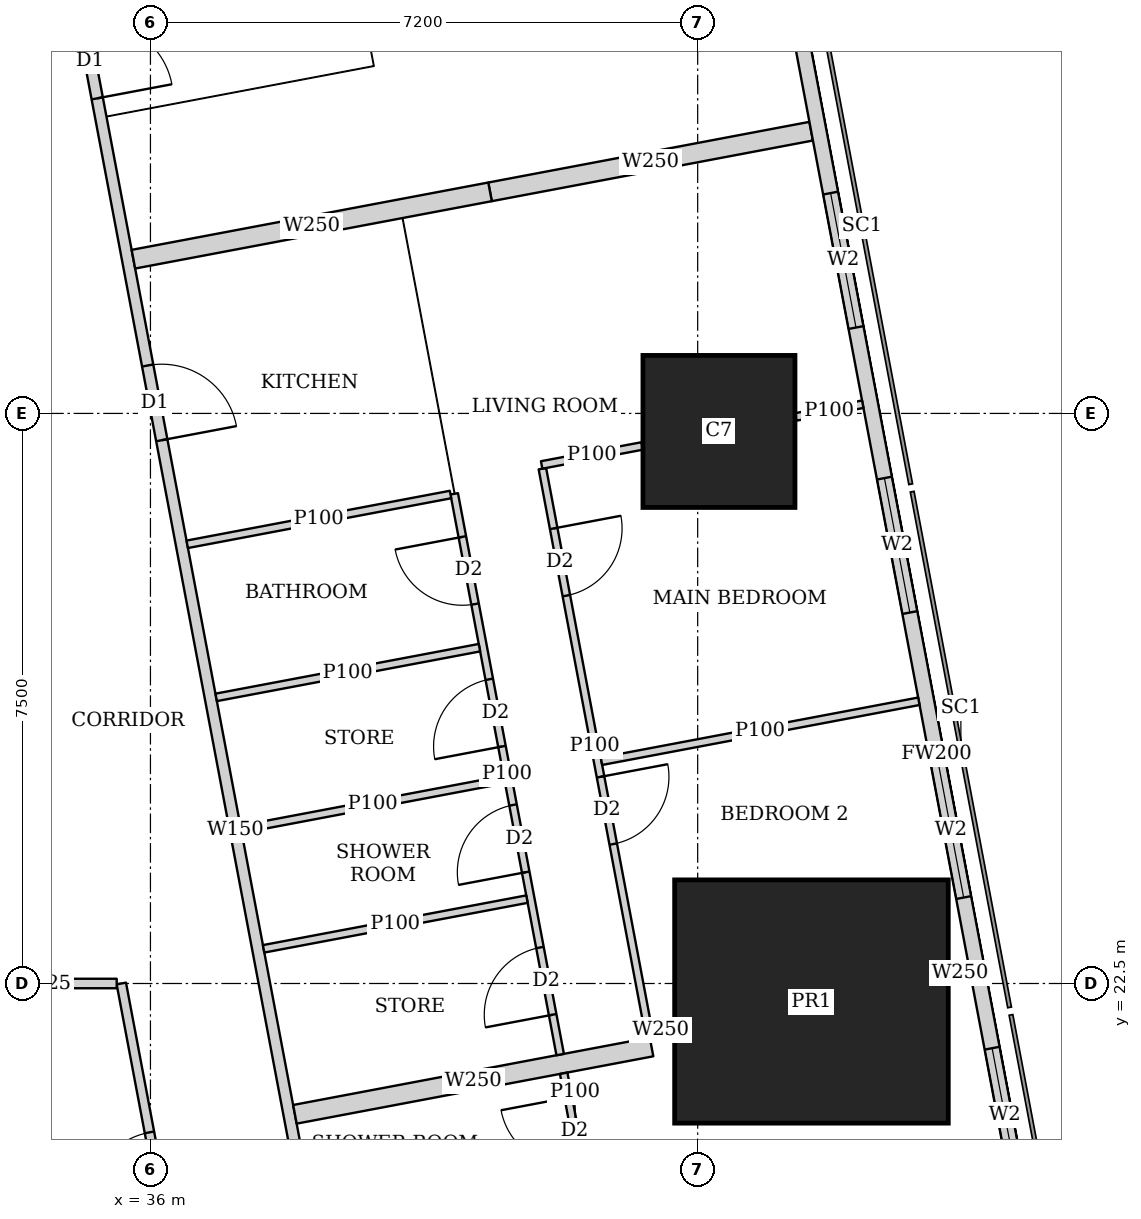
"""IFC4 building model, lengths in metres.
Left out: names, types, materials, properties, quantities, classifications, styles, units other than length and angle.
Written with IfcOpenShell. Run it as: python <this file> out.ifc"""

import sys

from ifc_helpers import new_model, si_unit, direction, frame, frame_2d, origin, origin_2d, place, context, subcontext, project, spatial, rectangle, extrude, element, fill, save


model = new_model("IFC4")
c1 = context("Model", 3, precision=1e-05, world=origin(), true_north=direction((0.0, 1.0)))
c2 = subcontext(c1, "Body", "Model", "MODEL_VIEW")
j1 = project(units=[si_unit("LENGTHUNIT", "METRE"), si_unit("PLANEANGLEUNIT", "RADIAN")], contexts=[c1])
p1 = place(None, origin())
s1 = spatial("IfcSite", under=j1, at=p1, CompositionType="ELEMENT")
p2 = place(p1, origin())
s2 = spatial("IfcBuilding", under=s1, at=p2, CompositionType="ELEMENT")
p3 = place(p2, frame((0.0, 0.0, 251.6)))
s3 = spatial("IfcBuildingStorey", under=s2, at=p3, CompositionType="ELEMENT", Elevation=251.6)
p4 = place(p3, frame((44.697, 22.263, 0.0), z_axis=(0.0, 0.0, 1.0), x_axis=(1.0, 0.0, 0.0)))
e1 = element("IfcColumn", 1, at=p4, inside=s3, PredefinedType="COLUMN", context=c2, shape_type="SweptSolid", body=[
    extrude(rectangle(XDim=3.6, YDim=3.2, at=origin_2d()), origin(), (0.0, 0.0, 1.0), 3.75),
])
p5 = place(p3, frame((43.48, 29.763, 0.0), z_axis=(0.0, 0.0, 1.0), x_axis=(1.0, 0.0, 0.0)))
e2 = element("IfcColumn", 2, at=p5, inside=s3, PredefinedType="COLUMN", context=c2, shape_type="SweptSolid", body=[
    extrude(rectangle(XDim=2.0, YDim=2.0, at=origin_2d()), origin(), (0.0, 0.0, 1.0), 3.75),
])
p6 = place(p3, frame((49.684, 7.832, 0.0), z_axis=(0.0, 0.0, 1.0), x_axis=(-0.185616669694, 0.982622232565, 0.0)))
e3 = element("IfcWall", 3, at=p6, inside=s3, PredefinedType="SOLIDWALL", context=c2, shape_type="SweptSolid", body=[
    extrude(rectangle(XDim=36.0, YDim=0.2, at=frame_2d((18.0, 0.0))), origin(), (0.0, 0.0, 1.0), 3.5),
])
p7 = place(p6, frame((2.518, 0.0, 0.9)))
e4 = element("IfcOpeningElement", 4, at=p7, cuts=e3, PredefinedType="OPENING", context=c2, shape_type="SweptSolid", body=[
    extrude(rectangle(XDim=2.4, YDim=1.5, at=frame_2d((1.2, 0.75))), frame((0.0, 0.11, 0.0), z_axis=(0.0, -1.0, 0.0), x_axis=(1.0, 0.0, 0.0)), (0.0, 0.0, 1.0), 0.22),
])
p8 = place(p6, frame((8.444, 0.0, 0.9)))
e5 = element("IfcOpeningElement", 5, at=p8, cuts=e3, PredefinedType="OPENING", context=c2, shape_type="SweptSolid", body=[
    extrude(rectangle(XDim=1.8, YDim=1.5, at=frame_2d((0.9, 0.75))), frame((0.0, 0.11, 0.0), z_axis=(0.0, -1.0, 0.0), x_axis=(1.0, 0.0, 0.0)), (0.0, 0.0, 1.0), 0.22),
])
p9 = place(p6, frame((12.261, 0.0, 0.9)))
e6 = element("IfcOpeningElement", 6, at=p9, cuts=e3, PredefinedType="OPENING", context=c2, shape_type="SweptSolid", body=[
    extrude(rectangle(XDim=1.8, YDim=1.5, at=frame_2d((0.9, 0.75))), frame((0.0, 0.11, 0.0), z_axis=(0.0, -1.0, 0.0), x_axis=(1.0, 0.0, 0.0)), (0.0, 0.0, 1.0), 0.22),
])
p10 = place(p6, frame((16.078, 0.0, 0.9)))
e7 = element("IfcOpeningElement", 7, at=p10, cuts=e3, PredefinedType="OPENING", context=c2, shape_type="SweptSolid", body=[
    extrude(rectangle(XDim=1.8, YDim=1.5, at=frame_2d((0.9, 0.75))), frame((0.0, 0.11, 0.0), z_axis=(0.0, -1.0, 0.0), x_axis=(1.0, 0.0, 0.0)), (0.0, 0.0, 1.0), 0.22),
])
p11 = place(p6, frame((19.894, 0.0, 0.9)))
e8 = element("IfcOpeningElement", 8, at=p11, cuts=e3, PredefinedType="OPENING", context=c2, shape_type="SweptSolid", body=[
    extrude(rectangle(XDim=1.8, YDim=1.5, at=frame_2d((0.9, 0.75))), frame((0.0, 0.11, 0.0), z_axis=(0.0, -1.0, 0.0), x_axis=(1.0, 0.0, 0.0)), (0.0, 0.0, 1.0), 0.22),
])
p12 = place(p6, frame((23.71, 0.0, 0.9)))
e9 = element("IfcOpeningElement", 9, at=p12, cuts=e3, PredefinedType="OPENING", context=c2, shape_type="SweptSolid", body=[
    extrude(rectangle(XDim=1.8, YDim=1.5, at=frame_2d((0.9, 0.75))), frame((0.0, 0.11, 0.0), z_axis=(0.0, -1.0, 0.0), x_axis=(1.0, 0.0, 0.0)), (0.0, 0.0, 1.0), 0.22),
])
p13 = place(p6, frame((27.526, 0.0, 0.9)))
e10 = element("IfcOpeningElement", 10, at=p13, cuts=e3, PredefinedType="OPENING", context=c2, shape_type="SweptSolid", body=[
    extrude(rectangle(XDim=1.8, YDim=1.5, at=frame_2d((0.9, 0.75))), frame((0.0, 0.11, 0.0), z_axis=(0.0, -1.0, 0.0), x_axis=(1.0, 0.0, 0.0)), (0.0, 0.0, 1.0), 0.22),
])
p14 = place(p6, frame((32.046, 0.0, 0.9)))
e11 = element("IfcOpeningElement", 11, at=p14, cuts=e3, PredefinedType="OPENING", context=c2, shape_type="SweptSolid", body=[
    extrude(rectangle(XDim=1.8, YDim=1.5, at=frame_2d((0.9, 0.75))), frame((0.0, 0.11, 0.0), z_axis=(0.0, -1.0, 0.0), x_axis=(1.0, 0.0, 0.0)), (0.0, 0.0, 1.0), 0.22),
])
p15 = place(p3, frame((33.781, 42.186, 0.0), z_axis=(0.0, 0.0, 1.0), x_axis=(0.185593518645, -0.9826266055, 0.0)))
e12 = element("IfcWall", 12, at=p15, inside=s3, PredefinedType="SOLIDWALL", context=c2, shape_type="SweptSolid", body=[
    extrude(rectangle(XDim=35.961, YDim=0.15, at=frame_2d((17.98, 0.0))), origin(), (0.0, 0.0, 1.0), 2.5),
])
p16 = place(p15, frame((7.183, 0.0, 0.0)))
e13 = element("IfcOpeningElement", 13, at=p16, cuts=e12, PredefinedType="OPENING", context=c2, shape_type="SweptSolid", body=[
    extrude(rectangle(XDim=1.0, YDim=2.1, at=frame_2d((0.5, 1.05))), frame((0.0, 0.085, 0.0), z_axis=(0.0, -1.0, 0.0), x_axis=(1.0, 0.0, 0.0)), (0.0, 0.0, 1.0), 0.17),
])
p17 = place(p15, frame((11.76, 0.0, 0.0)))
e14 = element("IfcOpeningElement", 14, at=p17, cuts=e12, PredefinedType="OPENING", context=c2, shape_type="SweptSolid", body=[
    extrude(rectangle(XDim=1.0, YDim=2.1, at=frame_2d((0.5, 1.05))), frame((0.0, 0.085, 0.0), z_axis=(0.0, -1.0, 0.0), x_axis=(1.0, 0.0, 0.0)), (0.0, 0.0, 1.0), 0.17),
])
p18 = place(p15, frame((23.863, 0.0, 0.0)))
e15 = element("IfcOpeningElement", 15, at=p18, cuts=e12, PredefinedType="OPENING", context=c2, shape_type="SweptSolid", body=[
    extrude(rectangle(XDim=1.0, YDim=2.1, at=frame_2d((0.5, 1.05))), frame((0.0, 0.085, 0.0), z_axis=(0.0, -1.0, 0.0), x_axis=(1.0, 0.0, 0.0)), (0.0, 0.0, 1.0), 0.17),
])
p19 = place(p15, frame((30.502, 0.0, 0.0)))
e16 = element("IfcOpeningElement", 16, at=p19, cuts=e12, PredefinedType="OPENING", context=c2, shape_type="SweptSolid", body=[
    extrude(rectangle(XDim=1.0, YDim=2.1, at=frame_2d((0.5, 1.05))), frame((0.0, 0.085, 0.0), z_axis=(0.0, -1.0, 0.0), x_axis=(1.0, 0.0, 0.0)), (0.0, 0.0, 1.0), 0.17),
])
p20 = place(p3, frame((41.157, 29.273, 0.0), z_axis=(0.0, 0.0, 1.0), x_axis=(0.18542464283, -0.982658486877, 0.0)))
e17 = element("IfcWall", 17, at=p20, inside=s3, PredefinedType="PARTITIONING", context=c2, shape_type="SweptSolid", body=[
    extrude(rectangle(XDim=7.421, YDim=0.1, at=frame_2d((3.71, 0.0))), origin(), (0.0, 0.0, 1.0), 2.5),
])
p21 = place(p20, frame((0.8, 0.0, 0.0)))
e18 = element("IfcOpeningElement", 18, at=p21, cuts=e17, PredefinedType="OPENING", context=c2, shape_type="SweptSolid", body=[
    extrude(rectangle(XDim=0.9, YDim=2.1, at=frame_2d((0.45, 1.05))), frame((0.0, 0.06, 0.0), z_axis=(0.0, -1.0, 0.0), x_axis=(1.0, 0.0, 0.0)), (0.0, 0.0, 1.0), 0.12),
])
p22 = place(p20, frame((4.126, 0.0, 0.0)))
e19 = element("IfcOpeningElement", 19, at=p22, cuts=e17, PredefinedType="OPENING", context=c2, shape_type="SweptSolid", body=[
    extrude(rectangle(XDim=0.9, YDim=2.1, at=frame_2d((0.45, 1.05))), frame((0.0, 0.06, 0.0), z_axis=(0.0, -1.0, 0.0), x_axis=(1.0, 0.0, 0.0)), (0.0, 0.0, 1.0), 0.12),
])
p23 = place(p3, frame((39.997, 28.942, 0.0), z_axis=(0.0, 0.0, 1.0), x_axis=(0.185686318797, -0.982609073341, 0.0)))
e20 = element("IfcWall", 20, at=p23, inside=s3, PredefinedType="PARTITIONING", context=c2, shape_type="SweptSolid", body=[
    extrude(rectangle(XDim=7.508, YDim=0.1, at=frame_2d((3.754, 0.0))), origin(), (0.0, 0.0, 1.0), 2.5),
])
p24 = place(p23, frame((0.576, 0.0, 0.0)))
e21 = element("IfcOpeningElement", 21, at=p24, cuts=e20, PredefinedType="OPENING", context=c2, shape_type="SweptSolid", body=[
    extrude(rectangle(XDim=0.9, YDim=2.1, at=frame_2d((0.45, 1.05))), frame((0.0, 0.06, 0.0), z_axis=(0.0, -1.0, 0.0), x_axis=(1.0, 0.0, 0.0)), (0.0, 0.0, 1.0), 0.12),
])
p25 = place(p23, frame((4.166, 0.0, 0.0)))
e22 = element("IfcOpeningElement", 22, at=p25, cuts=e20, PredefinedType="OPENING", context=c2, shape_type="SweptSolid", body=[
    extrude(rectangle(XDim=0.9, YDim=2.1, at=frame_2d((0.45, 1.05))), frame((0.0, 0.06, 0.0), z_axis=(0.0, -1.0, 0.0), x_axis=(1.0, 0.0, 0.0)), (0.0, 0.0, 1.0), 0.12),
])
p26 = place(p23, frame((2.483, 0.0, 0.0)))
e23 = element("IfcOpeningElement", 23, at=p26, cuts=e20, PredefinedType="OPENING", context=c2, shape_type="SweptSolid", body=[
    extrude(rectangle(XDim=0.9, YDim=2.1, at=frame_2d((0.45, 1.05))), frame((0.0, 0.06, 0.0), z_axis=(0.0, -1.0, 0.0), x_axis=(1.0, 0.0, 0.0)), (0.0, 0.0, 1.0), 0.12),
])
p27 = place(p23, frame((6.074, 0.0, 0.0)))
e24 = element("IfcOpeningElement", 24, at=p27, cuts=e20, PredefinedType="OPENING", context=c2, shape_type="SweptSolid", body=[
    extrude(rectangle(XDim=0.9, YDim=2.1, at=frame_2d((0.45, 1.05))), frame((0.0, 0.06, 0.0), z_axis=(0.0, -1.0, 0.0), x_axis=(1.0, 0.0, 0.0)), (0.0, 0.0, 1.0), 0.12),
])
p28 = place(p3, frame((45.372, 30.121, 0.0), z_axis=(0.0, 0.0, 1.0), x_axis=(-0.982547416156, -0.186012297994, 0.0)))
e25 = element("IfcWall", 25, at=p28, inside=s3, PredefinedType="PARTITIONING", context=c2, shape_type="SweptSolid", body=[
    extrude(rectangle(XDim=0.898, YDim=0.1, at=frame_2d((0.449, 0.0))), origin(), (0.0, 0.0, 1.0), 3.5),
])
p29 = place(p3, frame((42.47, 29.572, 0.0), z_axis=(0.0, 0.0, 1.0), x_axis=(-0.982610503289, -0.185678751683, 0.0)))
e26 = element("IfcWall", 26, at=p29, inside=s3, PredefinedType="PARTITIONING", context=c2, shape_type="SweptSolid", body=[
    extrude(rectangle(XDim=1.346, YDim=0.1, at=frame_2d((0.673, 0.0))), origin(), (0.0, 0.0, 1.0), 2.5),
])
p30 = place(p3, frame((46.11, 26.213, 0.0), z_axis=(0.0, 0.0, 1.0), x_axis=(-0.982623519589, -0.185609856287, 0.0)))
e27 = element("IfcWall", 27, at=p30, inside=s3, PredefinedType="PARTITIONING", context=c2, shape_type="SweptSolid", body=[
    extrude(rectangle(XDim=4.25, YDim=0.1, at=frame_2d((2.125, 0.0))), origin(), (0.0, 0.0, 1.0), 2.5),
])
p31 = place(p3, frame((39.948, 28.933, 0.0), z_axis=(0.0, 0.0, 1.0), x_axis=(-0.982588017646, -0.185797706064, 0.0)))
e28 = element("IfcWall", 28, at=p31, inside=s3, PredefinedType="PARTITIONING", context=c2, shape_type="SweptSolid", body=[
    extrude(rectangle(XDim=3.525, YDim=0.1, at=frame_2d((1.763, 0.0))), origin(), (0.0, 0.0, 1.0), 3.5),
])
p32 = place(p3, frame((40.656, 25.183, 0.0), z_axis=(0.0, 0.0, 1.0), x_axis=(-0.982576058723, -0.185860939478, 0.0)))
e29 = element("IfcWall", 29, at=p32, inside=s3, PredefinedType="PARTITIONING", context=c2, shape_type="SweptSolid", body=[
    extrude(rectangle(XDim=3.524, YDim=0.1, at=frame_2d((1.762, 0.0))), origin(), (0.0, 0.0, 1.0), 3.5),
])
p33 = place(p3, frame((40.329, 26.918, 0.0), z_axis=(0.0, 0.0, 1.0), x_axis=(-0.982638553676, -0.185530247748, 0.0)))
e30 = element("IfcWall", 30, at=p33, inside=s3, PredefinedType="PARTITIONING", context=c2, shape_type="SweptSolid", body=[
    extrude(rectangle(XDim=3.525, YDim=0.1, at=frame_2d((1.763, 0.0))), origin(), (0.0, 0.0, 1.0), 3.5),
])
p34 = place(p3, frame((40.954, 23.61, 0.0), z_axis=(0.0, 0.0, 1.0), x_axis=(-0.98264808502, -0.18547975902, 0.0)))
e31 = element("IfcWall", 31, at=p34, inside=s3, PredefinedType="PARTITIONING", context=c2, shape_type="SweptSolid", body=[
    extrude(rectangle(XDim=3.526, YDim=0.1, at=frame_2d((1.763, 0.0))), origin(), (0.0, 0.0, 1.0), 2.5),
])
p35 = place(p3, frame((44.693, 33.713, 0.0), z_axis=(0.0, 0.0, 1.0), x_axis=(-0.982633535512, -0.185556823879, 0.0)))
e32 = element("IfcWall", 32, at=p35, inside=s3, PredefinedType="SOLIDWALL", context=c2, shape_type="SweptSolid", body=[
    extrude(rectangle(XDim=4.3, YDim=0.25, at=frame_2d((2.15, 0.0))), origin(), (0.0, 0.0, 1.0), 2.5),
])
p36 = place(p3, frame((40.468, 32.915, 0.0), z_axis=(0.0, 0.0, 1.0), x_axis=(-0.982635807605, -0.185544791394, 0.0)))
e33 = element("IfcWall", 33, at=p36, inside=s3, PredefinedType="SOLIDWALL", context=c2, shape_type="SweptSolid", body=[
    extrude(rectangle(XDim=4.775, YDim=0.25, at=frame_2d((2.388, 0.0))), origin(), (0.0, 0.0, 1.0), 3.5),
])
p37 = place(p3, frame((41.437, 21.319, 0.0), z_axis=(0.0, 0.0, 1.0), x_axis=(0.185793689589, -0.982588777113, 0.0)))
e34 = element("IfcWall", 34, at=p37, inside=s3, PredefinedType="PARTITIONING", context=c2, shape_type="SweptSolid", body=[
    extrude(rectangle(XDim=1.625, YDim=0.1, at=frame_2d((0.813, 0.0))), origin(), (0.0, 0.0, 1.0), 3.5),
])
p38 = place(p37, frame((0.325, 0.0, 0.0)))
e35 = element("IfcOpeningElement", 35, at=p38, cuts=e34, PredefinedType="OPENING", context=c2, shape_type="SweptSolid", body=[
    extrude(rectangle(XDim=0.9, YDim=2.1, at=frame_2d((0.45, 1.05))), frame((0.0, 0.06, 0.0), z_axis=(0.0, -1.0, 0.0), x_axis=(1.0, 0.0, 0.0)), (0.0, 0.0, 1.0), 0.12),
])
p39 = place(p3, frame((46.782, 22.657, 0.0), z_axis=(0.0, 0.0, 1.0), x_axis=(-0.982104607121, -0.188336243648, 0.0)))
e36 = element("IfcWall", 36, at=p39, inside=s3, PredefinedType="SOLIDWALL", context=c2, shape_type="SweptSolid", body=[
    extrude(rectangle(XDim=0.266, YDim=0.25, at=frame_2d((0.133, 0.0))), origin(), (0.0, 0.0, 1.0), 3.5),
])
p40 = place(p3, frame((42.873, 21.918, 0.0), z_axis=(0.0, 0.0, 1.0), x_axis=(-0.982431406936, -0.186624035603, 0.0)))
e37 = element("IfcWall", 37, at=p40, inside=s3, PredefinedType="SOLIDWALL", context=c2, shape_type="SweptSolid", body=[
    extrude(rectangle(XDim=0.322, YDim=0.25, at=frame_2d((0.161, 0.0))), origin(), (0.0, 0.0, 1.0), 2.5),
])
p41 = place(p3, frame((42.593, 21.665, 0.0), z_axis=(0.0, 0.0, 1.0), x_axis=(-0.982635807605, -0.185544791394, 0.0)))
e38 = element("IfcWall", 38, at=p41, inside=s3, PredefinedType="SOLIDWALL", context=c2, shape_type="SweptSolid", body=[
    extrude(rectangle(XDim=4.775, YDim=0.25, at=frame_2d((2.388, 0.0))), origin(), (0.0, 0.0, 1.0), 2.5),
])
p42 = place(p3, frame((37.947, 10.163, 0.0), z_axis=(0.0, 0.0, 1.0), x_axis=(-0.185589250699, 0.982627411599, 0.0)))
e39 = element("IfcWall", 39, at=p42, inside=s3, PredefinedType="PARTITIONING", context=c2, shape_type="SweptSolid", body=[
    extrude(rectangle(XDim=12.555, YDim=0.125, at=frame_2d((6.277, 0.0))), origin(), (0.0, 0.0, 1.0), 2.5),
])
p43 = place(p42, frame((0.708, 0.0, 0.0)))
e40 = element("IfcOpeningElement", 40, at=p43, cuts=e39, PredefinedType="OPENING", context=c2, shape_type="SweptSolid", body=[
    extrude(rectangle(XDim=1.0, YDim=2.1, at=frame_2d((0.5, 1.05))), frame((0.0, 0.073, 0.0), z_axis=(0.0, -1.0, 0.0), x_axis=(1.0, 0.0, 0.0)), (0.0, 0.0, 1.0), 0.145),
])
p44 = place(p42, frame((5.9, 0.0, 0.0)))
e41 = element("IfcOpeningElement", 41, at=p44, cuts=e39, PredefinedType="OPENING", context=c2, shape_type="SweptSolid", body=[
    extrude(rectangle(XDim=1.0, YDim=2.1, at=frame_2d((0.5, 1.05))), frame((0.0, 0.073, 0.0), z_axis=(0.0, -1.0, 0.0), x_axis=(1.0, 0.0, 0.0)), (0.0, 0.0, 1.0), 0.145),
])
p45 = place(p42, frame((9.562, 0.0, 0.0)))
e42 = element("IfcOpeningElement", 42, at=p45, cuts=e39, PredefinedType="OPENING", context=c2, shape_type="SweptSolid", body=[
    extrude(rectangle(XDim=1.0, YDim=2.1, at=frame_2d((0.5, 1.05))), frame((0.0, 0.073, 0.0), z_axis=(0.0, -1.0, 0.0), x_axis=(1.0, 0.0, 0.0)), (0.0, 0.0, 1.0), 0.145),
])
p46 = place(p3, frame((33.701, 22.5, 0.0), z_axis=(0.0, 0.0, 1.0), x_axis=(1.0, 0.0, 0.0)))
e43 = element("IfcWall", 43, at=p46, inside=s3, PredefinedType="PARTITIONING", context=c2, shape_type="SweptSolid", body=[
    extrude(rectangle(XDim=1.855, YDim=0.125, at=frame_2d((0.927, 0.0))), origin(), (0.0, 0.0, 1.0), 2.5),
])
p47 = place(p9, origin())
e44 = element("IfcWindow", 44, at=p47, inside=s3, PartitioningType="SINGLE_PANEL", PredefinedType="WINDOW", context=c2, shape_type="SweptSolid", body=[
    extrude(rectangle(XDim=1.8, YDim=1.5, at=frame_2d((0.9, 0.75))), frame((0.0, 0.03, 0.0), z_axis=(0.0, -1.0, 0.0), x_axis=(1.0, 0.0, 0.0)), (0.0, 0.0, 1.0), 0.06),
])
fill(e6, e44)
p48 = place(p10, origin())
e45 = element("IfcWindow", 45, at=p48, inside=s3, PartitioningType="SINGLE_PANEL", PredefinedType="WINDOW", context=c2, shape_type="SweptSolid", body=[
    extrude(rectangle(XDim=1.8, YDim=1.5, at=frame_2d((0.9, 0.75))), frame((0.0, 0.03, 0.0), z_axis=(0.0, -1.0, 0.0), x_axis=(1.0, 0.0, 0.0)), (0.0, 0.0, 1.0), 0.06),
])
fill(e7, e45)
p49 = place(p11, origin())
e46 = element("IfcWindow", 46, at=p49, inside=s3, PartitioningType="SINGLE_PANEL", PredefinedType="WINDOW", context=c2, shape_type="SweptSolid", body=[
    extrude(rectangle(XDim=1.8, YDim=1.5, at=frame_2d((0.9, 0.75))), frame((0.0, 0.03, 0.0), z_axis=(0.0, -1.0, 0.0), x_axis=(1.0, 0.0, 0.0)), (0.0, 0.0, 1.0), 0.06),
])
fill(e8, e46)
p50 = place(p12, origin())
e47 = element("IfcWindow", 47, at=p50, inside=s3, PartitioningType="SINGLE_PANEL", PredefinedType="WINDOW", context=c2, shape_type="SweptSolid", body=[
    extrude(rectangle(XDim=1.8, YDim=1.5, at=frame_2d((0.9, 0.75))), frame((0.0, 0.03, 0.0), z_axis=(0.0, -1.0, 0.0), x_axis=(1.0, 0.0, 0.0)), (0.0, 0.0, 1.0), 0.06),
])
fill(e9, e47)
p51 = place(p16, origin())
e48 = element("IfcDoor", 48, at=p51, inside=s3, OperationType="SINGLE_SWING_RIGHT", PredefinedType="DOOR", context=c2, shape_type="SweptSolid", body=[
    extrude(rectangle(XDim=1.0, YDim=2.1, at=frame_2d((0.5, 1.05))), frame((0.0, 0.025, 0.0), z_axis=(0.0, -1.0, 0.0), x_axis=(1.0, 0.0, 0.0)), (0.0, 0.0, 1.0), 0.05),
])
fill(e13, e48)
p52 = place(p21, origin())
e49 = element("IfcDoor", 49, at=p52, inside=s3, OperationType="SINGLE_SWING_LEFT", PredefinedType="DOOR", context=c2, shape_type="SweptSolid", body=[
    extrude(rectangle(XDim=0.9, YDim=2.1, at=frame_2d((0.45, 1.05))), frame((0.0, 0.025, 0.0), z_axis=(0.0, -1.0, 0.0), x_axis=(1.0, 0.0, 0.0)), (0.0, 0.0, 1.0), 0.05),
])
fill(e18, e49)
p53 = place(p22, origin())
e50 = element("IfcDoor", 50, at=p53, inside=s3, OperationType="SINGLE_SWING_LEFT", PredefinedType="DOOR", context=c2, shape_type="SweptSolid", body=[
    extrude(rectangle(XDim=0.9, YDim=2.1, at=frame_2d((0.45, 1.05))), frame((0.0, 0.025, 0.0), z_axis=(0.0, -1.0, 0.0), x_axis=(1.0, 0.0, 0.0)), (0.0, 0.0, 1.0), 0.05),
])
fill(e19, e50)
p54 = place(p24, origin())
e51 = element("IfcDoor", 51, at=p54, inside=s3, OperationType="SINGLE_SWING_RIGHT", PredefinedType="DOOR", context=c2, shape_type="SweptSolid", body=[
    extrude(rectangle(XDim=0.9, YDim=2.1, at=frame_2d((0.45, 1.05))), frame((0.0, 0.025, 0.0), z_axis=(0.0, -1.0, 0.0), x_axis=(1.0, 0.0, 0.0)), (0.0, 0.0, 1.0), 0.05),
])
fill(e21, e51)
p55 = place(p25, origin())
e52 = element("IfcDoor", 52, at=p55, inside=s3, OperationType="SINGLE_SWING_LEFT", PredefinedType="DOOR", context=c2, shape_type="SweptSolid", body=[
    extrude(rectangle(XDim=0.9, YDim=2.1, at=frame_2d((0.45, 1.05))), frame((0.0, 0.025, 0.0), z_axis=(0.0, -1.0, 0.0), x_axis=(1.0, 0.0, 0.0)), (0.0, 0.0, 1.0), 0.05),
])
fill(e22, e52)
p56 = place(p26, origin())
e53 = element("IfcDoor", 53, at=p56, inside=s3, OperationType="SINGLE_SWING_LEFT", PredefinedType="DOOR", context=c2, shape_type="SweptSolid", body=[
    extrude(rectangle(XDim=0.9, YDim=2.1, at=frame_2d((0.45, 1.05))), frame((0.0, 0.025, 0.0), z_axis=(0.0, -1.0, 0.0), x_axis=(1.0, 0.0, 0.0)), (0.0, 0.0, 1.0), 0.05),
])
fill(e23, e53)
p57 = place(p27, origin())
e54 = element("IfcDoor", 54, at=p57, inside=s3, OperationType="SINGLE_SWING_LEFT", PredefinedType="DOOR", context=c2, shape_type="SweptSolid", body=[
    extrude(rectangle(XDim=0.9, YDim=2.1, at=frame_2d((0.45, 1.05))), frame((0.0, 0.025, 0.0), z_axis=(0.0, -1.0, 0.0), x_axis=(1.0, 0.0, 0.0)), (0.0, 0.0, 1.0), 0.05),
])
fill(e24, e54)
p58 = place(p17, origin())
e55 = element("IfcDoor", 55, at=p58, inside=s3, OperationType="SINGLE_SWING_RIGHT", PredefinedType="DOOR", context=c2, shape_type="SweptSolid", body=[
    extrude(rectangle(XDim=1.0, YDim=2.1, at=frame_2d((0.5, 1.05))), frame((0.0, 0.025, 0.0), z_axis=(0.0, -1.0, 0.0), x_axis=(1.0, 0.0, 0.0)), (0.0, 0.0, 1.0), 0.05),
])
fill(e14, e55)
p59 = place(p38, origin())
e56 = element("IfcDoor", 56, at=p59, inside=s3, OperationType="SINGLE_SWING_RIGHT", PredefinedType="DOOR", context=c2, shape_type="SweptSolid", body=[
    extrude(rectangle(XDim=0.9, YDim=2.1, at=frame_2d((0.45, 1.05))), frame((0.0, 0.025, 0.0), z_axis=(0.0, -1.0, 0.0), x_axis=(1.0, 0.0, 0.0)), (0.0, 0.0, 1.0), 0.05),
])
fill(e35, e56)
p60 = place(p45, origin())
e57 = element("IfcDoor", 57, at=p60, inside=s3, OperationType="SINGLE_SWING_LEFT", PredefinedType="DOOR", context=c2, shape_type="SweptSolid", body=[
    extrude(rectangle(XDim=1.0, YDim=2.1, at=frame_2d((0.5, 1.05))), frame((0.0, 0.025, 0.0), z_axis=(0.0, -1.0, 0.0), x_axis=(1.0, 0.0, 0.0)), (0.0, 0.0, 1.0), 0.05),
])
fill(e42, e57)
save(model, sys.argv[1])
